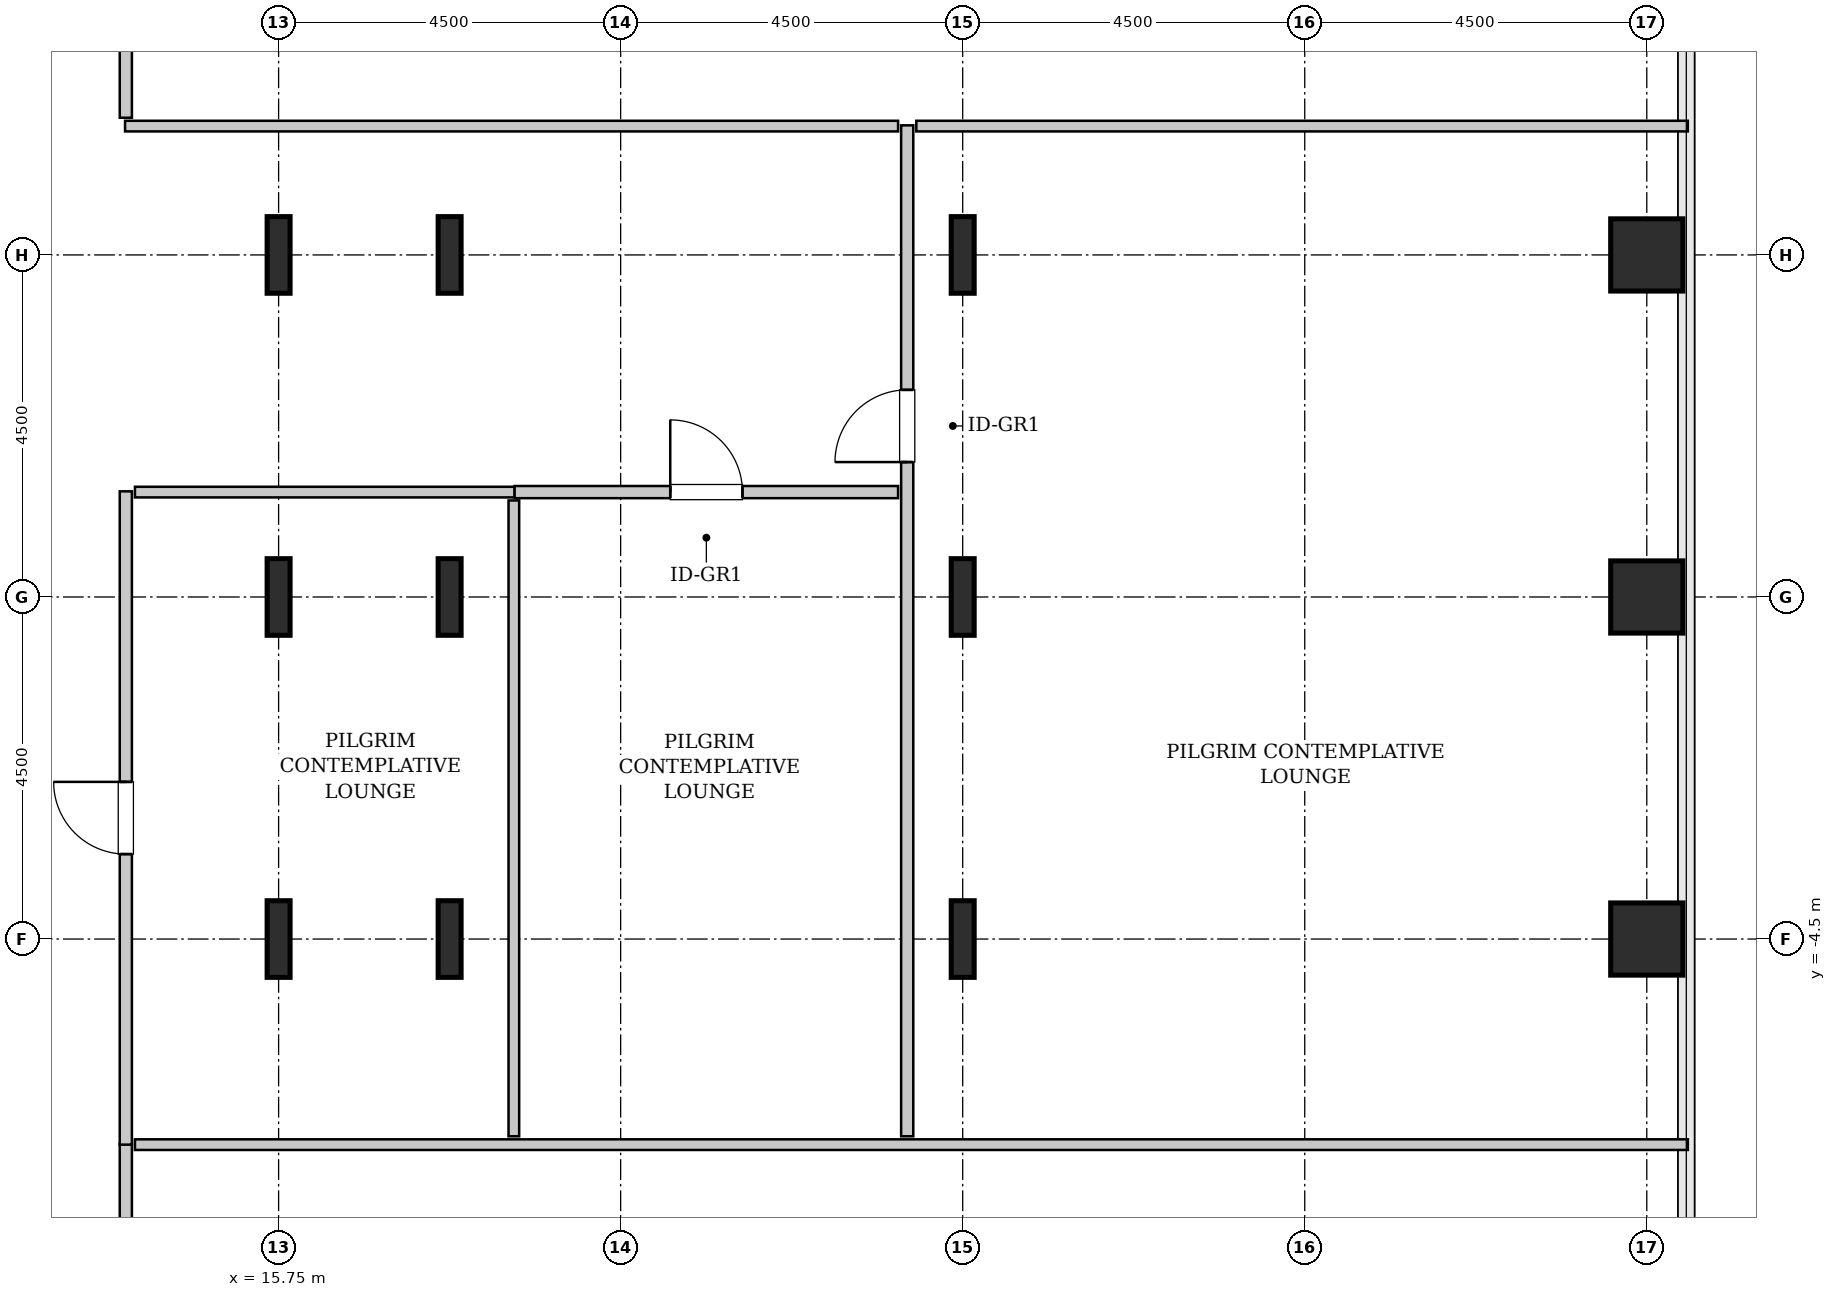
"""IFC4 building model, lengths in metres.
Left out: names, types, materials, properties, quantities, classifications, styles, units other than length and angle.
Written with IfcOpenShell. Run it as: python <this file> out.ifc"""

import sys

from ifc_helpers import new_model, si_unit, direction, frame, frame_2d, origin, origin_2d, place, context, subcontext, project, spatial, rectangle, hollow_rectangle, i_section, extrude, source, transform, mapped, element, fill, save


model = new_model("IFC4")
c1 = context("Model", 3, precision=1e-05, world=origin(), true_north=direction((0.0, 1.0)))
c2 = subcontext(c1, "Body", "Model", "MODEL_VIEW")
j1 = project(units=[si_unit("LENGTHUNIT", "METRE"), si_unit("PLANEANGLEUNIT", "RADIAN")], contexts=[c1])
p1 = place(None, origin())
s1 = spatial("IfcSite", under=j1, at=p1, CompositionType="ELEMENT")
p2 = place(p1, origin())
s2 = spatial("IfcBuilding", under=s1, at=p2, CompositionType="ELEMENT")
p3 = place(p2, frame((0.0, 0.0, 48.2)))
s3 = spatial("IfcBuildingStorey", under=s2, at=p3, CompositionType="ELEMENT", Elevation=48.2)
m1 = source(origin(), c2, "Body", "SweptSolid", [
    extrude(i_section(OverallWidth=0.302, OverallDepth=1.008, WebThickness=0.021, FlangeThickness=0.04, FilletRadius=0.03, at=origin_2d()), origin(), (0.0, 0.0, 1.0), 3.8),
])
for number, where, z_axis, x_axis in (
    (1, (15.75, -4.5, 0.0), (0.0, 0.0, 1.0), (1.0, 0.0, 0.0)),
    (2, (15.75, 0.0, 0.0), (0.0, 0.0, 1.0), (1.0, 0.0, 0.0)),
    (3, (15.75, 4.5, 0.0), (0.0, 0.0, 1.0), (1.0, 0.0, 0.0)),
    (4, (18.0, -4.5, 0.0), (0.0, 0.0, 1.0), (1.0, 0.0, 0.0)),
    (5, (18.0, 0.0, 0.0), (0.0, 0.0, 1.0), (1.0, 0.0, 0.0)),
    (6, (18.0, 4.5, 0.0), (0.0, 0.0, 1.0), (1.0, 0.0, 0.0)),
    (7, (24.75, -4.5, 0.0), (0.0, 0.0, 1.0), (1.0, 0.0, 0.0)),
    (8, (24.75, 0.0, 0.0), (0.0, 0.0, 1.0), (1.0, 0.0, 0.0)),
    (9, (24.75, 4.5, 0.0), (0.0, 0.0, 1.0), (1.0, 0.0, 0.0)),
):
    element("IfcColumn", number, at=place(p3, frame(where, z_axis=z_axis, x_axis=x_axis)), inside=s3, PredefinedType="COLUMN", context=c2, shape_type="MappedRepresentation", body=[
        mapped(m1, transform((0.0, 0.0, 0.0), x_axis=(1.0, 0.0, 0.0), y_axis=(0.0, 1.0, 0.0), z_axis=(0.0, 0.0, 1.0), scale=1.0)),
    ])
m2 = source(origin(), c2, "Body", "SweptSolid", [
    extrude(hollow_rectangle(XDim=0.95, YDim=0.95, WallThickness=0.045, InnerFilletRadius=0.045, OuterFilletRadius=0.09, at=origin_2d()), origin(), (0.0, 0.0, 1.0), 3.8),
])
for number, where, z_axis, x_axis in (
    (10, (33.75, -4.5, 0.0), (0.0, 0.0, 1.0), (1.0, 0.0, 0.0)),
    (11, (33.75, 0.0, 0.0), (0.0, 0.0, 1.0), (1.0, 0.0, 0.0)),
    (12, (33.75, 4.5, 0.0), (0.0, 0.0, 1.0), (1.0, 0.0, 0.0)),
):
    element("IfcColumn", number, at=place(p3, frame(where, z_axis=z_axis, x_axis=x_axis)), inside=s3, PredefinedType="COLUMN", context=c2, shape_type="MappedRepresentation", body=[
        mapped(m2, transform((0.0, 0.0, 0.0), x_axis=(1.0, 0.0, 0.0), y_axis=(0.0, 1.0, 0.0), z_axis=(0.0, 0.0, 1.0), scale=1.0)),
    ])
m3 = source(origin(), c2, "Body", "SweptSolid", [
    extrude(rectangle(XDim=15.845, YDim=0.16, at=frame_2d((7.922, 0.0))), origin(), (0.0, 0.0, 1.0), 3.535),
])
p4 = place(p3, frame((13.74, -23.04, 0.0), z_axis=(0.0, 0.0, 1.0), x_axis=(0.0, 1.0, 0.0)))
e13 = element("IfcWall", 13, at=p4, inside=s3, PredefinedType="PARTITIONING", context=c2, shape_type="MappedRepresentation", body=[
    mapped(m3, transform((0.0, 0.0, 0.0), x_axis=(1.0, 0.0, 0.0), y_axis=(0.0, 1.0, 0.0), z_axis=(0.0, 0.0, 1.0), scale=1.0)),
])
p5 = place(p4, frame((13.212, 0.0, 0.0)))
e14 = element("IfcOpeningElement", 14, at=p5, cuts=e13, PredefinedType="OPENING", context=c2, shape_type="SweptSolid", body=[
    extrude(rectangle(XDim=0.95, YDim=2.1, at=frame_2d((0.475, 1.05))), frame((0.0, 0.09, 0.0), z_axis=(0.0, -1.0, 0.0), x_axis=(1.0, 0.0, 0.0)), (0.0, 0.0, 1.0), 0.18),
])
m4 = source(origin(), c2, "Body", "SweptSolid", [
    extrude(rectangle(XDim=20.43, YDim=0.14, at=frame_2d((10.215, 0.0))), origin(), (0.0, 0.0, 1.0), 3.535),
])
p6 = place(p3, frame((13.86, -7.205, 0.0), z_axis=(0.0, 0.0, 1.0), x_axis=(1.0, 0.0, 0.0)))
e15 = element("IfcWall", 15, at=p6, inside=s3, PredefinedType="PARTITIONING", context=c2, shape_type="MappedRepresentation", body=[
    mapped(m4, transform((0.0, 0.0, 0.0), x_axis=(1.0, 0.0, 0.0), y_axis=(0.0, 1.0, 0.0), z_axis=(0.0, 0.0, 1.0), scale=1.0)),
])
m5 = source(origin(), c2, "Body", "SweptSolid", [
    extrude(rectangle(XDim=13.3, YDim=0.16, at=frame_2d((6.65, 0.0))), origin(), (0.0, 0.0, 1.0), 3.535),
])
p7 = place(p3, frame((24.02, -7.095, 0.0), z_axis=(0.0, 0.0, 1.0), x_axis=(0.0, 1.0, 0.0)))
e16 = element("IfcWall", 16, at=p7, inside=s3, PredefinedType="PARTITIONING", context=c2, shape_type="MappedRepresentation", body=[
    mapped(m5, transform((0.0, 0.0, 0.0), x_axis=(1.0, 0.0, 0.0), y_axis=(0.0, 1.0, 0.0), z_axis=(0.0, 0.0, 1.0), scale=1.0)),
])
p8 = place(p7, frame((8.87, 0.0, 0.0)))
e17 = element("IfcOpeningElement", 17, at=p8, cuts=e16, PredefinedType="OPENING", context=c2, shape_type="SweptSolid", body=[
    extrude(rectangle(XDim=0.95, YDim=2.1, at=frame_2d((0.475, 1.05))), frame((0.0, 0.09, 0.0), z_axis=(0.0, -1.0, 0.0), x_axis=(1.0, 0.0, 0.0)), (0.0, 0.0, 1.0), 0.18),
])
m6 = source(origin(), c2, "Body", "SweptSolid", [
    extrude(rectangle(XDim=10.17, YDim=0.14, at=frame_2d((5.085, 0.0))), origin(), (0.0, 0.0, 1.0), 3.535),
])
p9 = place(p3, frame((13.73, 6.195, 0.0), z_axis=(0.0, 0.0, 1.0), x_axis=(1.0, 0.0, 0.0)))
e18 = element("IfcWall", 18, at=p9, inside=s3, PredefinedType="PARTITIONING", context=c2, shape_type="MappedRepresentation", body=[
    mapped(m6, transform((0.0, 0.0, 0.0), x_axis=(1.0, 0.0, 0.0), y_axis=(0.0, 1.0, 0.0), z_axis=(0.0, 0.0, 1.0), scale=1.0)),
])
m7 = source(origin(), c2, "Body", "SweptSolid", [
    extrude(rectangle(XDim=10.15, YDim=0.14, at=frame_2d((5.075, 0.0))), origin(), (0.0, 0.0, 1.0), 3.535),
])
p10 = place(p3, frame((24.14, 6.195, 0.0), z_axis=(0.0, 0.0, 1.0), x_axis=(1.0, 0.0, 0.0)))
e19 = element("IfcWall", 19, at=p10, inside=s3, PredefinedType="PARTITIONING", context=c2, shape_type="MappedRepresentation", body=[
    mapped(m7, transform((0.0, 0.0, 0.0), x_axis=(1.0, 0.0, 0.0), y_axis=(0.0, 1.0, 0.0), z_axis=(0.0, 0.0, 1.0), scale=1.0)),
])
m8 = source(origin(), c2, "Body", "SweptSolid", [
    extrude(rectangle(XDim=8.595, YDim=0.16, at=frame_2d((4.297, 0.0))), origin(), (0.0, 0.0, 1.0), 3.535),
])
p11 = place(p3, frame((13.74, -7.205, 0.0), z_axis=(0.0, 0.0, 1.0), x_axis=(0.0, 1.0, 0.0)))
e20 = element("IfcWall", 20, at=p11, inside=s3, PredefinedType="PARTITIONING", context=c2, shape_type="MappedRepresentation", body=[
    mapped(m8, transform((0.0, 0.0, 0.0), x_axis=(1.0, 0.0, 0.0), y_axis=(0.0, 1.0, 0.0), z_axis=(0.0, 0.0, 1.0), scale=1.0)),
])
p12 = place(p11, frame((3.823, 0.0, 0.0)))
e21 = element("IfcOpeningElement", 21, at=p12, cuts=e20, PredefinedType="OPENING", context=c2, shape_type="SweptSolid", body=[
    extrude(rectangle(XDim=0.95, YDim=2.1, at=frame_2d((0.475, 1.05))), frame((0.0, 0.09, 0.0), z_axis=(0.0, -1.0, 0.0), x_axis=(1.0, 0.0, 0.0)), (0.0, 0.0, 1.0), 0.18),
])
m9 = source(origin(), c2, "Body", "SweptSolid", [
    extrude(rectangle(XDim=4.995, YDim=0.14, at=frame_2d((2.498, 0.0))), origin(), (0.0, 0.0, 1.0), 3.535),
])
p13 = place(p3, frame((13.86, 1.38, 0.0), z_axis=(0.0, 0.0, 1.0), x_axis=(1.0, 0.0, 0.0)))
e22 = element("IfcWall", 22, at=p13, inside=s3, PredefinedType="PARTITIONING", context=c2, shape_type="MappedRepresentation", body=[
    mapped(m9, transform((0.0, 0.0, 0.0), x_axis=(1.0, 0.0, 0.0), y_axis=(0.0, 1.0, 0.0), z_axis=(0.0, 0.0, 1.0), scale=1.0)),
])
m10 = source(origin(), c2, "Body", "SweptSolid", [
    extrude(rectangle(XDim=8.365, YDim=0.14, at=frame_2d((4.183, 0.0))), origin(), (0.0, 0.0, 1.0), 3.535),
])
p14 = place(p3, frame((18.845, -7.095, 0.0), z_axis=(0.0, 0.0, 1.0), x_axis=(0.0, 1.0, 0.0)))
e23 = element("IfcWall", 23, at=p14, inside=s3, PredefinedType="PARTITIONING", context=c2, shape_type="MappedRepresentation", body=[
    mapped(m10, transform((0.0, 0.0, 0.0), x_axis=(1.0, 0.0, 0.0), y_axis=(0.0, 1.0, 0.0), z_axis=(0.0, 0.0, 1.0), scale=1.0)),
])
m11 = source(origin(), c2, "Body", "SweptSolid", [
    extrude(rectangle(XDim=5.045, YDim=0.16, at=frame_2d((2.522, 0.0))), origin(), (0.0, 0.0, 1.0), 3.535),
])
p15 = place(p3, frame((18.855, 1.38, 0.0), z_axis=(0.0, 0.0, 1.0), x_axis=(1.0, 0.0, 0.0)))
e24 = element("IfcWall", 24, at=p15, inside=s3, PredefinedType="PARTITIONING", context=c2, shape_type="MappedRepresentation", body=[
    mapped(m11, transform((0.0, 0.0, 0.0), x_axis=(1.0, 0.0, 0.0), y_axis=(0.0, 1.0, 0.0), z_axis=(0.0, 0.0, 1.0), scale=1.0)),
])
p16 = place(p15, frame((2.048, 0.0, 0.0)))
e25 = element("IfcOpeningElement", 25, at=p16, cuts=e24, PredefinedType="OPENING", context=c2, shape_type="SweptSolid", body=[
    extrude(rectangle(XDim=0.95, YDim=2.1, at=frame_2d((0.475, 1.05))), frame((0.0, 0.09, 0.0), z_axis=(0.0, -1.0, 0.0), x_axis=(1.0, 0.0, 0.0)), (0.0, 0.0, 1.0), 0.18),
])
m12 = source(origin(), c2, "Body", "SweptSolid", [
    extrude(rectangle(XDim=16.735, YDim=0.16, at=frame_2d((8.368, 0.0))), origin(), (0.0, 0.0, 1.0), 3.535),
])
p17 = place(p3, frame((13.74, 6.305, 0.0), z_axis=(0.0, 0.0, 1.0), x_axis=(0.0, 1.0, 0.0)))
e26 = element("IfcWall", 26, at=p17, inside=s3, PredefinedType="PARTITIONING", context=c2, shape_type="MappedRepresentation", body=[
    mapped(m12, transform((0.0, 0.0, 0.0), x_axis=(1.0, 0.0, 0.0), y_axis=(0.0, 1.0, 0.0), z_axis=(0.0, 0.0, 1.0), scale=1.0)),
])
p18 = place(p17, frame((2.127, 0.0, 0.0)))
e27 = element("IfcOpeningElement", 27, at=p18, cuts=e26, PredefinedType="OPENING", context=c2, shape_type="SweptSolid", body=[
    extrude(rectangle(XDim=0.95, YDim=2.1, at=frame_2d((0.475, 1.05))), frame((0.0, 0.09, 0.0), z_axis=(0.0, -1.0, 0.0), x_axis=(1.0, 0.0, 0.0)), (0.0, 0.0, 1.0), 0.18),
])
m13 = source(origin(), c2, "Body", "SweptSolid", [
    extrude(rectangle(XDim=0.95, YDim=2.1, at=frame_2d((0.475, 1.05))), frame((0.0, 0.025, 0.0), z_axis=(0.0, -1.0, 0.0), x_axis=(1.0, 0.0, 0.0)), (0.0, 0.0, 1.0), 0.05),
])
p19 = place(p8, origin())
e28 = element("IfcDoor", 28, at=p19, inside=s3, OperationType="SINGLE_SWING_LEFT", PredefinedType="DOOR", context=c2, shape_type="MappedRepresentation", body=[
    mapped(m13, transform((0.0, 0.0, 0.0), x_axis=(1.0, 0.0, 0.0), y_axis=(0.0, 1.0, 0.0), z_axis=(0.0, 0.0, 1.0), scale=1.0)),
])
fill(e17, e28)
p20 = place(p12, origin())
e29 = element("IfcDoor", 29, at=p20, inside=s3, OperationType="SINGLE_SWING_RIGHT", PredefinedType="DOOR", context=c2, shape_type="MappedRepresentation", body=[
    mapped(m13, transform((0.0, 0.0, 0.0), x_axis=(1.0, 0.0, 0.0), y_axis=(0.0, 1.0, 0.0), z_axis=(0.0, 0.0, 1.0), scale=1.0)),
])
fill(e21, e29)
p21 = place(p16, origin())
e30 = element("IfcDoor", 30, at=p21, inside=s3, OperationType="SINGLE_SWING_LEFT", PredefinedType="DOOR", context=c2, shape_type="MappedRepresentation", body=[
    mapped(m13, transform((0.0, 0.0, 0.0), x_axis=(1.0, 0.0, 0.0), y_axis=(0.0, 1.0, 0.0), z_axis=(0.0, 0.0, 1.0), scale=1.0)),
])
fill(e25, e30)
save(model, sys.argv[1])
